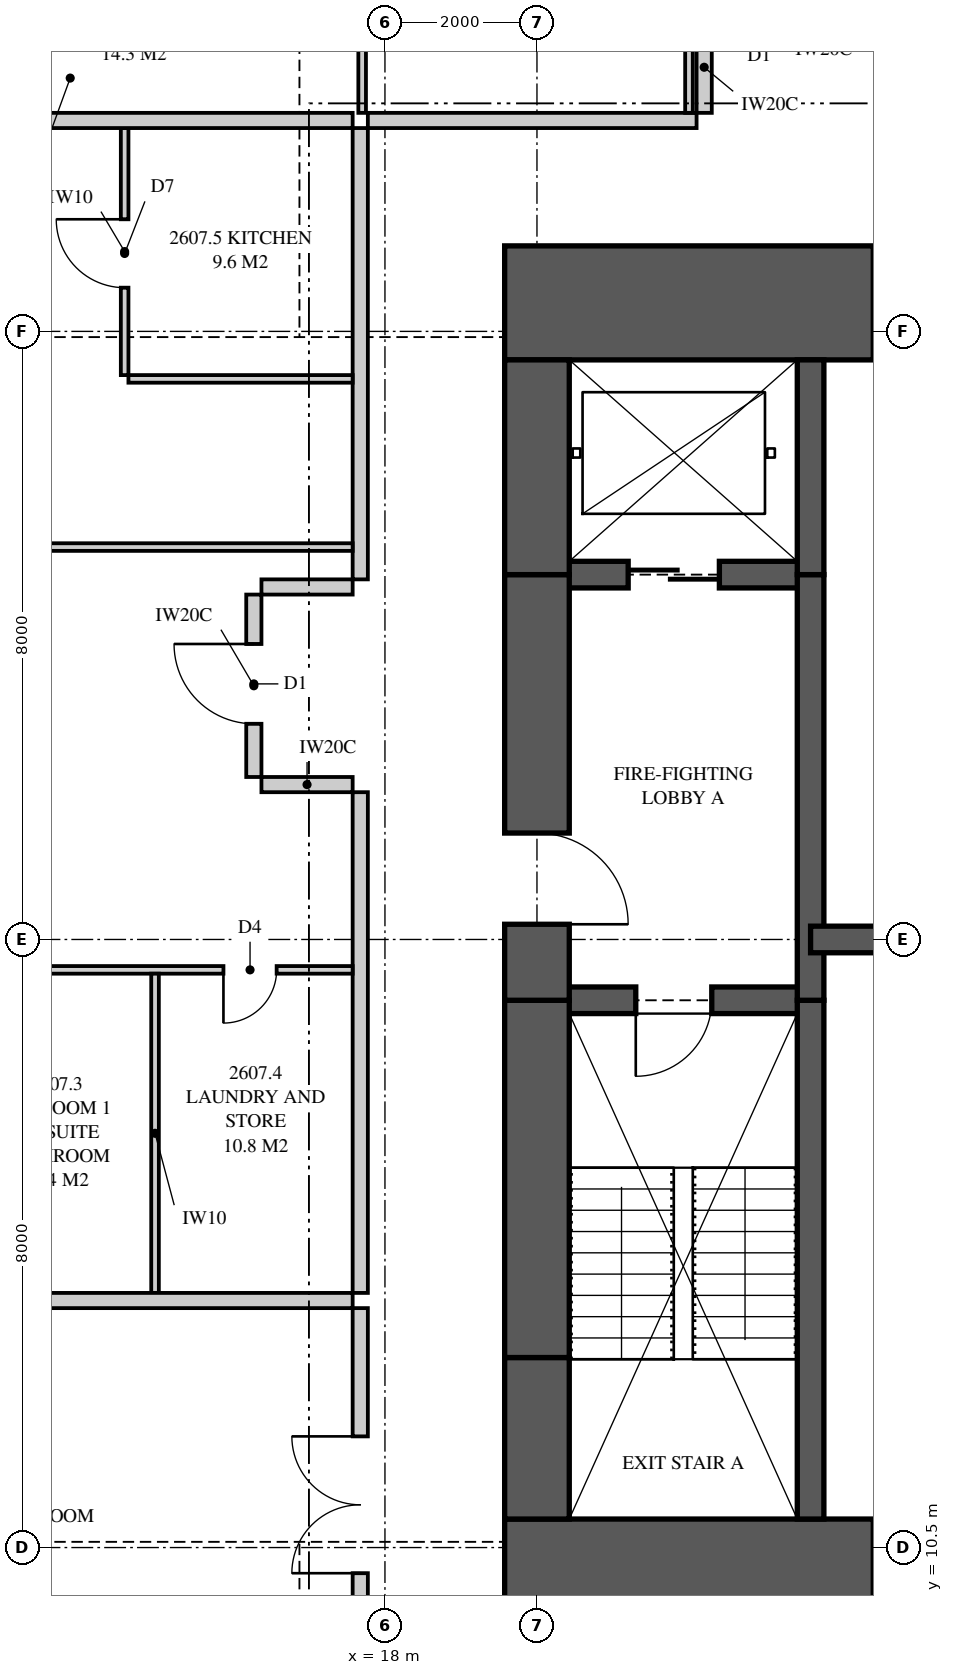
"""IFC4 building model, lengths in metres.
Left out: names, types, materials, properties, quantities, classifications, styles, units other than length and angle.
Written with IfcOpenShell. Run it as: python <this file> out.ifc"""

import sys

from ifc_helpers import new_model, si_unit, direction, frame, frame_2d, origin, place, context, subcontext, project, spatial, polyline, rectangle, outline, extrude, element, fill, save


model = new_model("IFC4")
c1 = context("Model", 3, precision=1e-05, world=origin(), true_north=direction((0.0, 1.0)))
c2 = subcontext(c1, "Body", "Model", "MODEL_VIEW")
j1 = project(units=[si_unit("LENGTHUNIT", "METRE"), si_unit("PLANEANGLEUNIT", "RADIAN")], contexts=[c1])
p1 = place(None, origin())
s1 = spatial("IfcSite", under=j1, at=p1, CompositionType="ELEMENT")
p2 = place(p1, origin())
s2 = spatial("IfcBuilding", under=s1, at=p2, CompositionType="ELEMENT")
p3 = place(p2, frame((0.0, 0.0, 98.15)))
s3 = spatial("IfcBuildingStorey", under=s2, at=p3, CompositionType="ELEMENT", Elevation=98.15)
p4 = place(p3, frame((19.575, 10.125, 0.0), z_axis=(0.0, 0.0, 1.0), x_axis=(1.0, 0.0, 0.0)))
e1 = element("IfcWall", 1, at=p4, inside=s3, PredefinedType="SHEAR", context=c2, shape_type="SweptSolid", body=[
    extrude(rectangle(XDim=6.425, YDim=1.5, at=frame_2d((3.212, 0.0))), origin(), (0.0, 0.0, 1.0), 3.35),
])
p5 = place(p4, frame((4.85, 0.0, 0.0)))
e2 = element("IfcOpeningElement", 2, at=p5, cuts=e1, PredefinedType="OPENING", context=c2, shape_type="SweptSolid", body=[
    extrude(rectangle(XDim=0.75, YDim=2.1, at=frame_2d((0.375, 1.05))), frame((0.0, 0.76, 0.0), z_axis=(0.0, -1.0, 0.0), x_axis=(1.0, 0.0, 0.0)), (0.0, 0.0, 1.0), 1.52),
])
p6 = place(p3, frame((26.0, 26.875, 0.0), z_axis=(0.0, 0.0, 1.0), x_axis=(-1.0, 0.0, 0.0)))
e3 = element("IfcWall", 3, at=p6, inside=s3, PredefinedType="SHEAR", context=c2, shape_type="SweptSolid", body=[
    extrude(rectangle(XDim=6.425, YDim=1.5, at=frame_2d((3.212, 0.0))), origin(), (0.0, 0.0, 1.0), 3.35),
])
p7 = place(p6, frame((0.825, 0.0, 0.0)))
e4 = element("IfcOpeningElement", 4, at=p7, cuts=e3, PredefinedType="OPENING", context=c2, shape_type="SweptSolid", body=[
    extrude(rectangle(XDim=0.75, YDim=2.1, at=frame_2d((0.375, 1.05))), frame((0.0, 0.76, 0.0), z_axis=(0.0, -1.0, 0.0), x_axis=(1.0, 0.0, 0.0)), (0.0, 0.0, 1.0), 1.52),
])
p8 = place(p3, frame((20.0, 26.125, 0.0), z_axis=(0.0, 0.0, 1.0), x_axis=(0.0, -1.0, 0.0)))
e5 = element("IfcWall", 5, at=p8, inside=s3, PredefinedType="SHEAR", context=c2, shape_type="SweptSolid", body=[
    extrude(rectangle(XDim=2.825, YDim=0.85, at=frame_2d((1.413, 0.0))), origin(), (0.0, 0.0, 1.0), 3.35),
])
p9 = place(p3, frame((20.0, 23.3, 0.0), z_axis=(0.0, 0.0, 1.0), x_axis=(0.0, -1.0, 0.0)))
e6 = element("IfcWall", 6, at=p9, inside=s3, PredefinedType="SHEAR", context=c2, shape_type="SweptSolid", body=[
    extrude(rectangle(XDim=5.6, YDim=0.85, at=frame_2d((2.8, 0.0))), origin(), (0.0, 0.0, 1.0), 3.35),
])
p10 = place(p9, frame((3.4, 0.0, 0.0)))
e7 = element("IfcOpeningElement", 7, at=p10, cuts=e6, PredefinedType="OPENING", context=c2, shape_type="SweptSolid", body=[
    extrude(rectangle(XDim=1.2, YDim=2.2, at=frame_2d((0.6, 1.1))), frame((0.0, 0.435, 0.0), z_axis=(0.0, -1.0, 0.0), x_axis=(1.0, 0.0, 0.0)), (0.0, 0.0, 1.0), 0.87),
])
p11 = place(p3, frame((20.0, 17.7, 0.0), z_axis=(0.0, 0.0, 1.0), x_axis=(0.0, -1.0, 0.0)))
e8 = element("IfcWall", 8, at=p11, inside=s3, PredefinedType="SHEAR", context=c2, shape_type="SweptSolid", body=[
    extrude(rectangle(XDim=4.7, YDim=0.85, at=frame_2d((2.35, 0.0))), origin(), (0.0, 0.0, 1.0), 3.35),
])
p12 = place(p3, frame((20.0, 13.0, 0.0), z_axis=(0.0, 0.0, 1.0), x_axis=(0.0, -1.0, 0.0)))
e9 = element("IfcWall", 9, at=p12, inside=s3, PredefinedType="SHEAR", context=c2, shape_type="SweptSolid", body=[
    extrude(rectangle(XDim=2.125, YDim=0.85, at=frame_2d((1.062, 0.0))), origin(), (0.0, 0.0, 1.0), 3.35),
])
p13 = place(p3, frame((23.6, 10.875, 0.0), z_axis=(0.0, 0.0, 1.0), x_axis=(0.0, 1.0, 0.0)))
e10 = element("IfcWall", 10, at=p13, inside=s3, PredefinedType="SHEAR", context=c2, shape_type="SweptSolid", body=[
    extrude(rectangle(XDim=6.825, YDim=0.35, at=frame_2d((3.413, 0.0))), origin(), (0.0, 0.0, 1.0), 3.35),
])
p14 = place(p3, frame((23.6, 17.7, 0.0), z_axis=(0.0, 0.0, 1.0), x_axis=(0.0, 1.0, 0.0)))
e11 = element("IfcWall", 11, at=p14, inside=s3, PredefinedType="SHEAR", context=c2, shape_type="SweptSolid", body=[
    extrude(rectangle(XDim=5.6, YDim=0.35, at=frame_2d((2.8, 0.0))), origin(), (0.0, 0.0, 1.0), 3.35),
])
p15 = place(p3, frame((23.6, 23.3, 0.0), z_axis=(0.0, 0.0, 1.0), x_axis=(0.0, 1.0, 0.0)))
e12 = element("IfcWall", 12, at=p15, inside=s3, PredefinedType="SHEAR", context=c2, shape_type="SweptSolid", body=[
    extrude(rectangle(XDim=2.825, YDim=0.35, at=frame_2d((1.413, 0.0))), origin(), (0.0, 0.0, 1.0), 3.35),
])
p16 = place(p3, frame((20.0, 17.7, 0.0), z_axis=(0.0, 0.0, 1.0), x_axis=(1.0, 0.0, 0.0)))
e13 = element("IfcWall", 13, at=p16, inside=s3, PredefinedType="SHEAR", context=c2, shape_type="SweptSolid", body=[
    extrude(rectangle(XDim=3.6, YDim=0.35, at=frame_2d((1.8, 0.0))), origin(), (0.0, 0.0, 1.0), 3.35),
])
p17 = place(p16, frame((1.3, 0.0, 0.0)))
e14 = element("IfcOpeningElement", 14, at=p17, cuts=e13, PredefinedType="OPENING", context=c2, shape_type="SweptSolid", body=[
    extrude(rectangle(XDim=1.0, YDim=2.1, at=frame_2d((0.5, 1.05))), frame((0.0, 0.185, 0.0), z_axis=(0.0, -1.0, 0.0), x_axis=(1.0, 0.0, 0.0)), (0.0, 0.0, 1.0), 0.37),
])
p18 = place(p3, frame((20.0, 23.3, 0.0), z_axis=(0.0, 0.0, 1.0), x_axis=(1.0, 0.0, 0.0)))
e15 = element("IfcWall", 15, at=p18, inside=s3, PredefinedType="SHEAR", context=c2, shape_type="SweptSolid", body=[
    extrude(rectangle(XDim=3.6, YDim=0.35, at=frame_2d((1.8, 0.0))), origin(), (0.0, 0.0, 1.0), 3.35),
])
p19 = place(p18, frame((1.2, 0.0, 0.0)))
e16 = element("IfcOpeningElement", 16, at=p19, cuts=e15, PredefinedType="OPENING", context=c2, shape_type="SweptSolid", body=[
    extrude(rectangle(XDim=1.2, YDim=2.1, at=frame_2d((0.6, 1.05))), frame((0.0, 0.185, 0.0), z_axis=(0.0, -1.0, 0.0), x_axis=(1.0, 0.0, 0.0)), (0.0, 0.0, 1.0), 0.37),
])
p20 = place(p3, frame((23.6, 18.5, 0.0), z_axis=(0.0, 0.0, 1.0), x_axis=(1.0, 0.0, 0.0)))
e17 = element("IfcWall", 17, at=p20, inside=s3, PredefinedType="SHEAR", context=c2, shape_type="SweptSolid", body=[
    extrude(rectangle(XDim=2.4, YDim=0.35, at=frame_2d((1.2, 0.0))), origin(), (0.0, 0.0, 1.0), 3.35),
])
p21 = place(p3, frame((17.775, 29.275, 0.0), z_axis=(0.0, 0.0, 1.0), x_axis=(1.0, 0.0, 0.0)))
e18 = element("IfcWall", 18, at=p21, inside=s3, PredefinedType="PARTITIONING", context=c2, shape_type="SweptSolid", body=[
    extrude(rectangle(XDim=4.325, YDim=0.2, at=frame_2d((2.163, 0.0))), origin(), (0.0, 0.0, 1.0), 3.11),
])
p22 = place(p3, frame((17.7, 37.825, 0.0), z_axis=(0.0, 0.0, 1.0), x_axis=(0.0, -1.0, 0.0)))
e19 = element("IfcWall", 19, at=p22, inside=s3, PredefinedType="PARTITIONING", context=c2, shape_type="SweptSolid", body=[
    extrude(outline(polyline([(1.635, 2.15), (0.0, 2.15), (0.0, 0.0), (8.45, 0.0), (8.45, 3.11), (1.635, 3.11), (1.635, 2.15)]), holes=[polyline([(1.021, 0.116), (0.529, 0.116), (0.529, 0.906), (1.021, 0.906), (1.021, 0.116)]), polyline([(1.021, 1.244), (0.529, 1.244), (0.529, 2.034), (1.021, 2.034), (1.021, 1.244)])]), frame((0.0, 0.05, 0.0), z_axis=(0.0, -1.0, 0.0), x_axis=(1.0, 0.0, 0.0)), (0.0, 0.0, 1.0), 0.1),
])
p23 = place(p22, frame((4.6, 0.0, 0.0)))
e20 = element("IfcOpeningElement", 20, at=p23, cuts=e19, PredefinedType="OPENING", context=c2, shape_type="SweptSolid", body=[
    extrude(rectangle(XDim=0.9, YDim=2.1, at=frame_2d((0.45, 1.05))), frame((0.0, 0.06, 0.0), z_axis=(0.0, -1.0, 0.0), x_axis=(1.0, 0.0, 0.0)), (0.0, 0.0, 1.0), 0.12),
])
p24 = place(p3, frame((22.0, 37.825, 0.0), z_axis=(0.0, 0.0, 1.0), x_axis=(0.0, -1.0, 0.0)))
e21 = element("IfcWall", 21, at=p24, inside=s3, PredefinedType="PARTITIONING", context=c2, shape_type="SweptSolid", body=[
    extrude(outline(polyline([(0.0, 0.0), (8.45, 0.0), (8.45, 3.11), (1.635, 3.11), (1.635, 2.15), (0.0, 2.15), (0.0, 3.11), (0.0, 0.0)])), frame((0.0, 0.05, 0.0), z_axis=(0.0, -1.0, 0.0), x_axis=(1.0, 0.0, 0.0)), (0.0, 0.0, 1.0), 0.1),
])
p25 = place(p24, frame((4.6, 0.0, 0.0)))
e22 = element("IfcOpeningElement", 22, at=p25, cuts=e21, PredefinedType="OPENING", context=c2, shape_type="SweptSolid", body=[
    extrude(rectangle(XDim=0.9, YDim=2.1, at=frame_2d((0.45, 1.05))), frame((0.0, 0.06, 0.0), z_axis=(0.0, -1.0, 0.0), x_axis=(1.0, 0.0, 0.0)), (0.0, 0.0, 1.0), 0.12),
])
p26 = place(p24, frame((6.05, 0.0, 0.0)))
e23 = element("IfcOpeningElement", 23, at=p26, cuts=e21, PredefinedType="OPENING", context=c2, shape_type="SweptSolid", body=[
    extrude(rectangle(XDim=0.9, YDim=2.1, at=frame_2d((0.45, 1.05))), frame((0.0, 0.06, 0.0), z_axis=(0.0, -1.0, 0.0), x_axis=(1.0, 0.0, 0.0)), (0.0, 0.0, 1.0), 0.12),
])
p27 = place(p3, frame((6.0, 29.275, 0.0), z_axis=(0.0, 0.0, 1.0), x_axis=(1.0, 0.0, 0.0)))
e24 = element("IfcWall", 24, at=p27, inside=s3, PredefinedType="PARTITIONING", context=c2, shape_type="SweptSolid", body=[
    extrude(outline(polyline([(0.0, 0.0), (11.575, 0.0), (11.575, 3.11), (11.212, 3.11), (11.212, 2.541), (10.538, 2.541), (10.538, 3.11), (5.51, 3.11), (5.51, 2.51), (2.969, 2.51), (2.969, 2.541), (2.565, 2.541), (2.565, 2.15), (0.721, 2.15), (0.721, 3.11), (0.0, 3.11), (0.0, 0.0)])), frame((0.0, 0.1, 0.0), z_axis=(0.0, -1.0, 0.0), x_axis=(1.0, 0.0, 0.0)), (0.0, 0.0, 1.0), 0.2),
])
p28 = place(p3, frame((6.175, 13.75, 0.0), z_axis=(0.0, 0.0, 1.0), x_axis=(1.0, 0.0, 0.0)))
e25 = element("IfcWall", 25, at=p28, inside=s3, PredefinedType="PARTITIONING", context=c2, shape_type="SweptSolid", body=[
    extrude(outline(polyline([(1.685, 2.15), (0.0, 2.15), (0.0, 0.0), (11.4, 0.0), (11.4, 3.11), (5.335, 3.11), (5.335, 2.51), (2.715, 2.51), (2.715, 3.11), (1.685, 3.11), (1.685, 2.15)]), holes=[polyline([(1.021, 0.133), (0.529, 0.133), (0.529, 0.991), (1.021, 0.991), (1.021, 0.133)]), polyline([(1.021, 1.159), (0.529, 1.159), (0.529, 2.017), (1.021, 2.017), (1.021, 1.159)])]), frame((0.0, 0.1, 0.0), z_axis=(0.0, -1.0, 0.0), x_axis=(1.0, 0.0, 0.0)), (0.0, 0.0, 1.0), 0.2),
])
p29 = place(p3, frame((17.675, 7.825, 0.0), z_axis=(0.0, 0.0, 1.0), x_axis=(0.0, 1.0, 0.0)))
e26 = element("IfcWall", 26, at=p29, inside=s3, PredefinedType="PARTITIONING", context=c2, shape_type="SweptSolid", body=[
    extrude(outline(polyline([(0.0, 0.0), (5.825, 0.0), (5.825, 3.11), (3.087, 3.11), (3.087, 2.541), (2.413, 2.541), (2.413, 3.11), (0.0, 3.11), (0.0, 0.0)])), frame((0.0, 0.1, 0.0), z_axis=(0.0, -1.0, 0.0), x_axis=(1.0, 0.0, 0.0)), (0.0, 0.0, 1.0), 0.2),
])
p30 = place(p29, frame((2.337, 0.0, 0.0)))
e27 = element("IfcOpeningElement", 27, at=p30, cuts=e26, PredefinedType="OPENING", context=c2, shape_type="SweptSolid", body=[
    extrude(rectangle(XDim=1.8, YDim=2.1, at=frame_2d((0.9, 1.05))), frame((0.0, 0.11, 0.0), z_axis=(0.0, -1.0, 0.0), x_axis=(1.0, 0.0, 0.0)), (0.0, 0.0, 1.0), 0.22),
])
p31 = place(p3, frame((17.675, 13.85, 0.0), z_axis=(0.0, 0.0, 1.0), x_axis=(0.0, 1.0, 0.0)))
e28 = element("IfcWall", 28, at=p31, inside=s3, PredefinedType="PARTITIONING", context=c2, shape_type="SweptSolid", body=[
    extrude(rectangle(XDim=6.587, YDim=0.2, at=frame_2d((3.294, 0.0))), origin(), (0.0, 0.0, 1.0), 3.11),
])
p32 = place(p3, frame((6.175, 18.1, 0.0), z_axis=(0.0, 0.0, 1.0), x_axis=(1.0, 0.0, 0.0)))
e29 = element("IfcWall", 29, at=p32, inside=s3, PredefinedType="PARTITIONING", context=c2, shape_type="SweptSolid", body=[
    extrude(outline(polyline([(0.0, 0.0), (11.4, 0.0), (11.4, 3.11), (5.285, 3.11), (5.285, 2.51), (2.765, 2.51), (2.765, 3.11), (1.635, 3.11), (1.635, 2.15), (0.0, 2.15), (0.0, 3.11), (0.0, 0.0)])), frame((0.0, 0.05, 0.0), z_axis=(0.0, -1.0, 0.0), x_axis=(1.0, 0.0, 0.0)), (0.0, 0.0, 1.0), 0.1),
])
p33 = place(p32, frame((4.85, 0.0, 0.0)))
e30 = element("IfcOpeningElement", 30, at=p33, cuts=e29, PredefinedType="OPENING", context=c2, shape_type="SweptSolid", body=[
    extrude(rectangle(XDim=0.9, YDim=2.1, at=frame_2d((0.45, 1.05))), frame((0.0, 0.06, 0.0), z_axis=(0.0, -1.0, 0.0), x_axis=(1.0, 0.0, 0.0)), (0.0, 0.0, 1.0), 0.12),
])
p34 = place(p32, frame((9.7, 0.0, 0.0)))
e31 = element("IfcOpeningElement", 31, at=p34, cuts=e29, PredefinedType="OPENING", context=c2, shape_type="SweptSolid", body=[
    extrude(rectangle(XDim=0.7, YDim=2.1, at=frame_2d((0.35, 1.05))), frame((0.0, 0.06, 0.0), z_axis=(0.0, -1.0, 0.0), x_axis=(1.0, 0.0, 0.0)), (0.0, 0.0, 1.0), 0.12),
])
p35 = place(p3, frame((14.975, 13.85, 0.0), z_axis=(0.0, 0.0, 1.0), x_axis=(0.0, 1.0, 0.0)))
e32 = element("IfcWall", 32, at=p35, inside=s3, PredefinedType="PARTITIONING", context=c2, shape_type="SweptSolid", body=[
    extrude(rectangle(XDim=4.2, YDim=0.1, at=frame_2d((2.1, 0.0))), origin(), (0.0, 0.0, 1.0), 3.11),
])
p36 = place(p3, frame((14.575, 25.925, 0.0), z_axis=(0.0, 0.0, 1.0), x_axis=(0.0, 1.0, 0.0)))
e33 = element("IfcWall", 33, at=p36, inside=s3, PredefinedType="PARTITIONING", context=c2, shape_type="SweptSolid", body=[
    extrude(outline(polyline([(0.0, 0.0), (3.25, 0.0), (3.25, 3.11), (0.787, 3.11), (0.787, 2.541), (0.213, 2.541), (0.213, 3.11), (0.0, 3.11), (0.0, 0.0)])), frame((0.0, 0.05, 0.0), z_axis=(0.0, -1.0, 0.0), x_axis=(1.0, 0.0, 0.0)), (0.0, 0.0, 1.0), 0.1),
])
p37 = place(p36, frame((1.15, 0.0, 0.0)))
e34 = element("IfcOpeningElement", 34, at=p37, cuts=e33, PredefinedType="OPENING", context=c2, shape_type="SweptSolid", body=[
    extrude(rectangle(XDim=0.9, YDim=2.1, at=frame_2d((0.45, 1.05))), frame((0.0, 0.06, 0.0), z_axis=(0.0, -1.0, 0.0), x_axis=(1.0, 0.0, 0.0)), (0.0, 0.0, 1.0), 0.12),
])
p38 = place(p3, frame((14.625, 25.875, 0.0), z_axis=(0.0, 0.0, 1.0), x_axis=(1.0, 0.0, 0.0)))
e35 = element("IfcWall", 35, at=p38, inside=s3, PredefinedType="PARTITIONING", context=c2, shape_type="SweptSolid", body=[
    extrude(rectangle(XDim=2.95, YDim=0.1, at=frame_2d((1.475, 0.0))), origin(), (0.0, 0.0, 1.0), 3.11),
])
p39 = place(p3, frame((6.175, 23.663, 0.0), z_axis=(0.0, 0.0, 1.0), x_axis=(1.0, 0.0, 0.0)))
e36 = element("IfcWall", 36, at=p39, inside=s3, PredefinedType="PARTITIONING", context=c2, shape_type="SweptSolid", body=[
    extrude(outline(polyline([(0.529, 2.15), (0.0, 2.15), (0.0, 0.0), (0.529, 0.0), (0.529, 0.556), (1.021, 0.556), (1.021, 0.0), (11.4, 0.0), (11.4, 3.11), (5.285, 3.11), (5.285, 2.51), (2.765, 2.51), (2.765, 3.11), (1.635, 3.11), (1.635, 2.15), (1.021, 2.15), (1.021, 1.594), (0.529, 1.594), (0.529, 2.15)])), frame((0.0, 0.05, 0.0), z_axis=(0.0, -1.0, 0.0), x_axis=(1.0, 0.0, 0.0)), (0.0, 0.0, 1.0), 0.1),
])
p40 = place(p39, frame((5.2, 0.0, 0.0)))
e37 = element("IfcOpeningElement", 37, at=p40, cuts=e36, PredefinedType="OPENING", context=c2, shape_type="SweptSolid", body=[
    extrude(rectangle(XDim=1.0, YDim=2.1, at=frame_2d((0.5, 1.05))), frame((0.0, 0.06, 0.0), z_axis=(0.0, -1.0, 0.0), x_axis=(1.0, 0.0, 0.0)), (0.0, 0.0, 1.0), 0.12),
])
p41 = place(p3, frame((22.2, 29.375, 0.0), z_axis=(0.0, 0.0, 1.0), x_axis=(0.0, 1.0, 0.0)))
e38 = element("IfcWall", 38, at=p41, inside=s3, PredefinedType="PARTITIONING", context=c2, shape_type="SweptSolid", body=[
    extrude(rectangle(XDim=1.2, YDim=0.2, at=frame_2d((0.6, 0.0))), origin(), (0.0, 0.0, 1.0), 3.11),
])
p42 = place(p3, frame((17.675, 23.238, 0.0), z_axis=(0.0, 0.0, 1.0), x_axis=(0.0, 1.0, 0.0)))
e39 = element("IfcWall", 39, at=p42, inside=s3, PredefinedType="PARTITIONING", context=c2, shape_type="SweptSolid", body=[
    extrude(outline(polyline([(0.0, 0.0), (5.938, 0.0), (5.938, 3.11), (3.525, 3.11), (3.525, 2.541), (2.85, 2.541), (2.85, 3.11), (0.0, 3.11), (0.0, 0.0)])), frame((0.0, 0.1, 0.0), z_axis=(0.0, -1.0, 0.0), x_axis=(1.0, 0.0, 0.0)), (0.0, 0.0, 1.0), 0.2),
])
p43 = place(p3, frame((16.275, 20.637, 0.0), z_axis=(0.0, 0.0, 1.0), x_axis=(0.0, 1.0, 0.0)))
e40 = element("IfcWall", 40, at=p43, inside=s3, PredefinedType="PARTITIONING", context=c2, shape_type="SweptSolid", body=[
    extrude(rectangle(XDim=2.4, YDim=0.2, at=frame_2d((1.2, 0.0))), origin(), (0.0, 0.0, 1.0), 3.11),
])
p44 = place(p43, frame((0.7, 0.0, 0.0)))
e41 = element("IfcOpeningElement", 41, at=p44, cuts=e40, PredefinedType="OPENING", context=c2, shape_type="SweptSolid", body=[
    extrude(rectangle(XDim=1.05, YDim=2.2, at=frame_2d((0.525, 1.1))), frame((0.0, 0.11, 0.0), z_axis=(0.0, -1.0, 0.0), x_axis=(1.0, 0.0, 0.0)), (0.0, 0.0, 1.0), 0.22),
])
for number, where, z_axis, x_axis in (
    (42, (17.575, 20.538, 0.0), (0.0, 0.0, 1.0), (-1.0, 0.0, 0.0)),
    (43, (17.575, 23.137, 0.0), (0.0, 0.0, 1.0), (-1.0, 0.0, 0.0)),
):
    element("IfcWall", number, at=place(p3, frame(where, z_axis=z_axis, x_axis=x_axis)), inside=s3, PredefinedType="PARTITIONING", context=c2, shape_type="SweptSolid", body=[
        extrude(rectangle(XDim=1.2, YDim=0.2, at=frame_2d((0.6, 0.0))), origin(), (0.0, 0.0, 1.0), 3.11),
    ])
p45 = place(p30, origin())
e44 = element("IfcDoor", 44, at=p45, inside=s3, OperationType="DOUBLE_DOOR_SINGLE_SWING", PredefinedType="DOOR", context=c2, shape_type="SweptSolid", body=[
    extrude(rectangle(XDim=1.8, YDim=2.1, at=frame_2d((0.9, 1.05))), frame((0.0, 0.025, 0.0), z_axis=(0.0, -1.0, 0.0), x_axis=(1.0, 0.0, 0.0)), (0.0, 0.0, 1.0), 0.05),
])
fill(e27, e44)
p46 = place(p44, origin())
e45 = element("IfcDoor", 45, at=p46, inside=s3, OperationType="SINGLE_SWING_RIGHT", PredefinedType="DOOR", context=c2, shape_type="SweptSolid", body=[
    extrude(rectangle(XDim=1.05, YDim=2.2, at=frame_2d((0.525, 1.1))), frame((0.0, 0.025, 0.0), z_axis=(0.0, -1.0, 0.0), x_axis=(1.0, 0.0, 0.0)), (0.0, 0.0, 1.0), 0.05),
])
fill(e41, e45)
p47 = place(p34, frame((0.7, 0.0, 0.0), z_axis=(0.0, 0.0, 1.0), x_axis=(-1.0, 0.0, 0.0)))
e46 = element("IfcDoor", 46, at=p47, inside=s3, OperationType="SINGLE_SWING_RIGHT", PredefinedType="DOOR", context=c2, shape_type="SweptSolid", body=[
    extrude(rectangle(XDim=0.7, YDim=2.1, at=frame_2d((0.35, 1.05))), frame((0.0, 0.025, 0.0), z_axis=(0.0, -1.0, 0.0), x_axis=(1.0, 0.0, 0.0)), (0.0, 0.0, 1.0), 0.05),
])
fill(e31, e46)
p48 = place(p37, origin())
e47 = element("IfcDoor", 47, at=p48, inside=s3, OperationType="SINGLE_SWING_RIGHT", PredefinedType="DOOR", context=c2, shape_type="SweptSolid", body=[
    extrude(rectangle(XDim=0.9, YDim=2.1, at=frame_2d((0.45, 1.05))), frame((0.0, 0.025, 0.0), z_axis=(0.0, -1.0, 0.0), x_axis=(1.0, 0.0, 0.0)), (0.0, 0.0, 1.0), 0.05),
])
fill(e34, e47)
p49 = place(p17, frame((1.0, 0.0, 0.0), z_axis=(0.0, 0.0, 1.0), x_axis=(-1.0, 0.0, 0.0)))
e48 = element("IfcDoor", 48, at=p49, inside=s3, OperationType="SINGLE_SWING_RIGHT", PredefinedType="DOOR", context=c2, shape_type="SweptSolid", body=[
    extrude(rectangle(XDim=1.0, YDim=2.1, at=frame_2d((0.5, 1.05))), frame((0.0, 0.025, 0.0), z_axis=(0.0, -1.0, 0.0), x_axis=(1.0, 0.0, 0.0)), (0.0, 0.0, 1.0), 0.05),
])
fill(e14, e48)
p50 = place(p10, origin())
e49 = element("IfcDoor", 49, at=p50, inside=s3, OperationType="SINGLE_SWING_RIGHT", PredefinedType="DOOR", context=c2, shape_type="SweptSolid", body=[
    extrude(rectangle(XDim=1.2, YDim=2.2, at=frame_2d((0.6, 1.1))), frame((0.0, 0.025, 0.0), z_axis=(0.0, -1.0, 0.0), x_axis=(1.0, 0.0, 0.0)), (0.0, 0.0, 1.0), 0.05),
])
fill(e7, e49)
p51 = place(p19, origin())
e50 = element("IfcDoor", 50, at=p51, inside=s3, OperationType="SLIDING_TO_LEFT", PredefinedType="DOOR", context=c2, shape_type="SweptSolid", body=[
    extrude(rectangle(XDim=1.2, YDim=2.1, at=frame_2d((0.6, 1.05))), frame((0.0, 0.025, 0.0), z_axis=(0.0, -1.0, 0.0), x_axis=(1.0, 0.0, 0.0)), (0.0, 0.0, 1.0), 0.05),
])
fill(e16, e50)
save(model, sys.argv[1])
